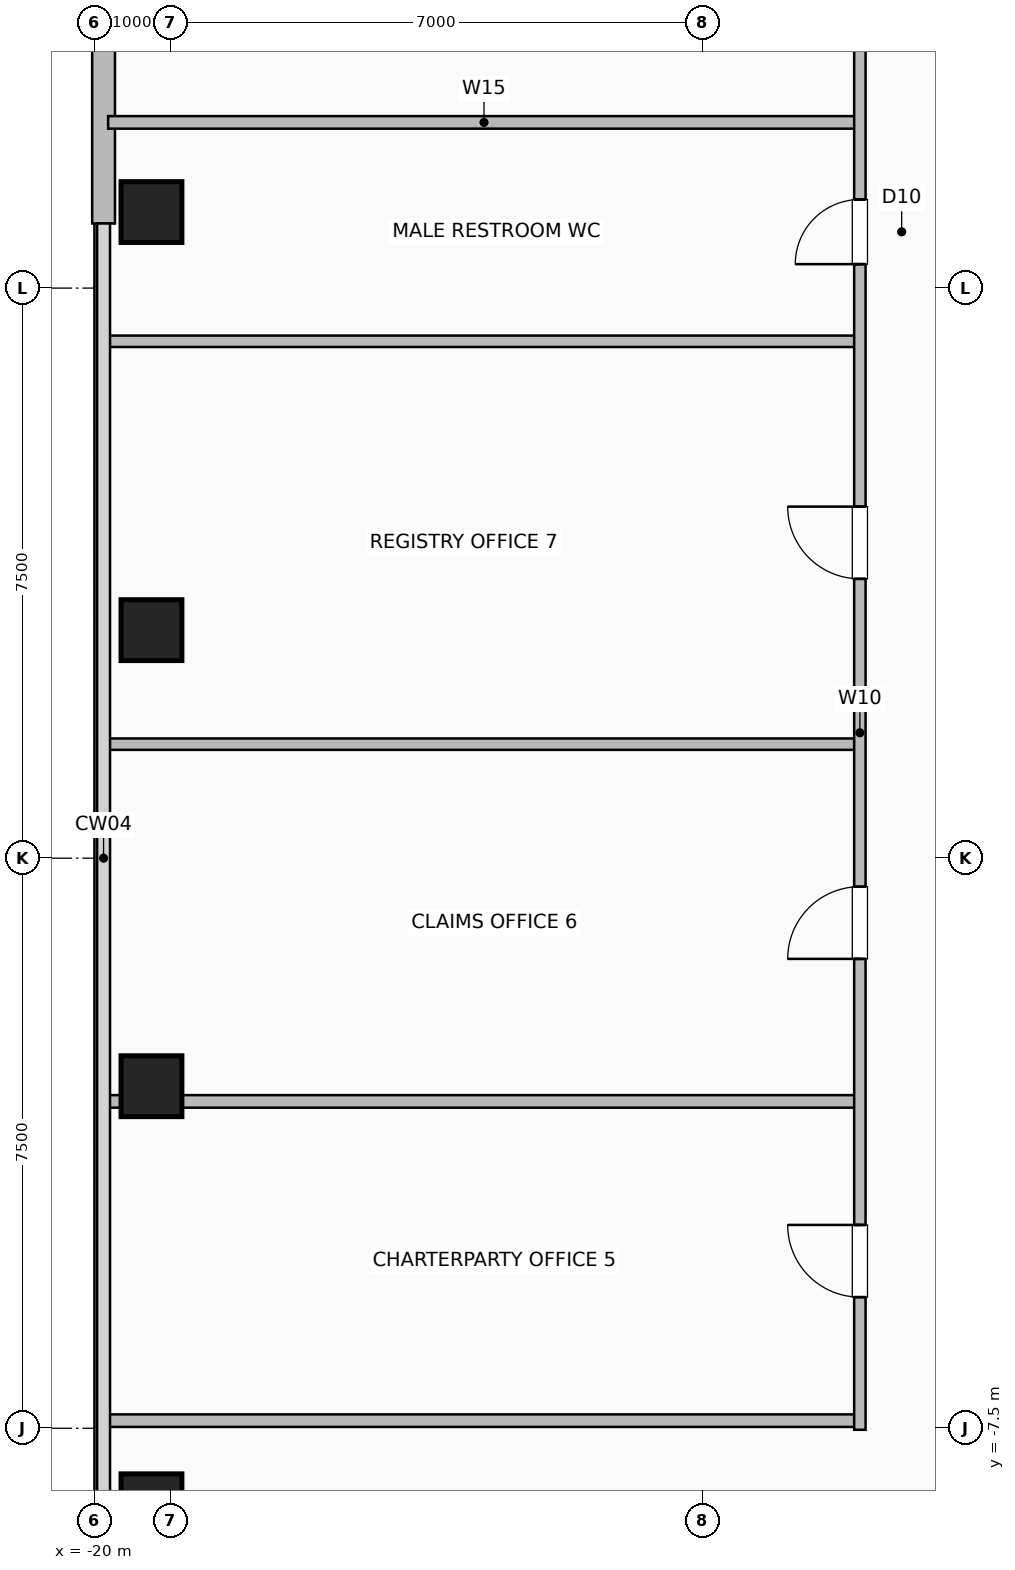
"""IFC4 building model, lengths in metres.
Left out: names, types, materials, properties, quantities, classifications, styles, units other than length and angle.
Written with IfcOpenShell. Run it as: python <this file> out.ifc"""

import sys

from ifc_helpers import new_model, si_unit, direction, frame, frame_2d, origin, origin_2d, place, context, subcontext, project, spatial, rectangle, hollow_rectangle, extrude, element, fill, save


model = new_model("IFC4")
c1 = context("Model", 3, precision=1e-05, world=origin(), true_north=direction((0.0, 1.0)))
c2 = subcontext(c1, "Body", "Model", "MODEL_VIEW")
j1 = project(units=[si_unit("LENGTHUNIT", "METRE"), si_unit("PLANEANGLEUNIT", "RADIAN")], contexts=[c1])
p1 = place(None, origin())
s1 = spatial("IfcSite", under=j1, at=p1, CompositionType="ELEMENT")
p2 = place(p1, origin())
s2 = spatial("IfcBuilding", under=s1, at=p2, CompositionType="ELEMENT")
p3 = place(p2, frame((0.0, 0.0, 169.8)))
s3 = spatial("IfcBuildingStorey", under=s2, at=p3, CompositionType="ELEMENT", Elevation=169.8)
for number, where, z_axis, x_axis in (
    (1, (-19.25, -8.5, 0.0), (0.0, 0.0, 1.0), (1.0, 0.0, 0.0)),
    (2, (-19.25, -3.0, 0.0), (0.0, 0.0, 1.0), (1.0, 0.0, 0.0)),
    (3, (-19.25, 3.0, 0.0), (0.0, 0.0, 1.0), (1.0, 0.0, 0.0)),
    (4, (-19.25, 8.5, 0.0), (0.0, 0.0, 1.0), (1.0, 0.0, 0.0)),
):
    element("IfcColumn", number, at=place(p3, frame(where, z_axis=z_axis, x_axis=x_axis)), inside=s3, PredefinedType="COLUMN", context=c2, shape_type="SweptSolid", body=[
        extrude(hollow_rectangle(XDim=0.8, YDim=0.8, WallThickness=0.04, at=origin_2d()), origin(), (0.0, 0.0, 1.0), 3.6),
    ])
p4 = place(p3, frame((-19.88, 8.35, 0.0), z_axis=(0.0, 0.0, 1.0), x_axis=(0.0, 1.0, 0.0)))
e5 = element("IfcWall", 5, at=p4, inside=s3, PredefinedType="SOLIDWALL", context=c2, shape_type="SweptSolid", body=[
    extrude(rectangle(XDim=4.8, YDim=0.3, at=frame_2d((2.4, 0.0))), origin(), (0.0, 0.0, 1.0), 3.36),
])
for number, where, z_axis, x_axis in (
    (6, (-19.82, 9.68, 0.0), (0.0, 0.0, 1.0), (1.0, 0.0, 0.0)),
    (7, (-19.82, -7.4, 0.0), (0.0, 0.0, 1.0), (1.0, 0.0, 0.0)),
    (8, (-19.82, -3.2, 0.0), (0.0, 0.0, 1.0), (1.0, 0.0, 0.0)),
):
    element("IfcWall", number, at=place(p3, frame(where, z_axis=z_axis, x_axis=x_axis)), inside=s3, PredefinedType="PLUMBINGWALL", context=c2, shape_type="SweptSolid", body=[
        extrude(rectangle(XDim=9.89, YDim=0.165, at=frame_2d((4.945, 0.0))), origin(), (0.0, 0.0, 1.0), 3.36),
    ])
for number, where, z_axis, x_axis in (
    (9, (-19.82, 1.5, 0.0), (0.0, 0.0, 1.0), (1.0, 0.0, 0.0)),
    (10, (-19.82, 6.8, 0.0), (0.0, 0.0, 1.0), (1.0, 0.0, 0.0)),
):
    element("IfcWall", number, at=place(p3, frame(where, z_axis=z_axis, x_axis=x_axis)), inside=s3, PredefinedType="PARTITIONING", context=c2, shape_type="SweptSolid", body=[
        extrude(rectangle(XDim=9.89, YDim=0.15, at=frame_2d((4.945, 0.0))), origin(), (0.0, 0.0, 1.0), 3.36),
    ])
p5 = place(p3, frame((-9.93, -7.52, 0.0), z_axis=(0.0, 0.0, 1.0), x_axis=(0.0, 1.0, 0.0)))
e11 = element("IfcWall", 11, at=p5, inside=s3, PredefinedType="PARTITIONING", context=c2, shape_type="SweptSolid", body=[
    extrude(rectangle(XDim=21.59, YDim=0.15, at=frame_2d((10.795, 0.0))), origin(), (0.0, 0.0, 1.0), 3.36),
])
p6 = place(p5, frame((1.745, 0.0, 0.0)))
e12 = element("IfcOpeningElement", 12, at=p6, cuts=e11, PredefinedType="OPENING", context=c2, shape_type="SweptSolid", body=[
    extrude(rectangle(XDim=0.95, YDim=2.06, at=frame_2d((0.475, 1.03))), frame((0.0, 0.085, 0.0), z_axis=(0.0, -1.0, 0.0), x_axis=(1.0, 0.0, 0.0)), (0.0, 0.0, 1.0), 0.17),
])
p7 = place(p5, frame((6.195, 0.0, 0.0)))
e13 = element("IfcOpeningElement", 13, at=p7, cuts=e11, PredefinedType="OPENING", context=c2, shape_type="SweptSolid", body=[
    extrude(rectangle(XDim=0.95, YDim=2.06, at=frame_2d((0.475, 1.03))), frame((0.0, 0.085, 0.0), z_axis=(0.0, -1.0, 0.0), x_axis=(1.0, 0.0, 0.0)), (0.0, 0.0, 1.0), 0.17),
])
p8 = place(p5, frame((11.195, 0.0, 0.0)))
e14 = element("IfcOpeningElement", 14, at=p8, cuts=e11, PredefinedType="OPENING", context=c2, shape_type="SweptSolid", body=[
    extrude(rectangle(XDim=0.95, YDim=2.06, at=frame_2d((0.475, 1.03))), frame((0.0, 0.085, 0.0), z_axis=(0.0, -1.0, 0.0), x_axis=(1.0, 0.0, 0.0)), (0.0, 0.0, 1.0), 0.17),
])
p9 = place(p5, frame((15.335, 0.0, 0.0)))
e15 = element("IfcOpeningElement", 15, at=p9, cuts=e11, PredefinedType="OPENING", context=c2, shape_type="SweptSolid", body=[
    extrude(rectangle(XDim=0.85, YDim=2.05, at=frame_2d((0.425, 1.025))), frame((0.0, 0.085, 0.0), z_axis=(0.0, -1.0, 0.0), x_axis=(1.0, 0.0, 0.0)), (0.0, 0.0, 1.0), 0.17),
])
p10 = place(p5, frame((18.86, 0.0, 0.0)))
e16 = element("IfcOpeningElement", 16, at=p10, cuts=e11, PredefinedType="OPENING", context=c2, shape_type="SweptSolid", body=[
    extrude(rectangle(XDim=0.95, YDim=2.06, at=frame_2d((0.475, 1.03))), frame((0.0, 0.085, 0.0), z_axis=(0.0, -1.0, 0.0), x_axis=(1.0, 0.0, 0.0)), (0.0, 0.0, 1.0), 0.17),
])
p11 = place(p6, origin())
e17 = element("IfcDoor", 17, at=p11, inside=s3, OperationType="SINGLE_SWING_RIGHT", PredefinedType="DOOR", context=c2, shape_type="SweptSolid", body=[
    extrude(rectangle(XDim=0.95, YDim=2.06, at=frame_2d((0.475, 1.03))), frame((0.0, 0.025, 0.0), z_axis=(0.0, -1.0, 0.0), x_axis=(1.0, 0.0, 0.0)), (0.0, 0.0, 1.0), 0.05),
])
fill(e12, e17)
p12 = place(p7, origin())
e18 = element("IfcDoor", 18, at=p12, inside=s3, OperationType="SINGLE_SWING_LEFT", PredefinedType="DOOR", context=c2, shape_type="SweptSolid", body=[
    extrude(rectangle(XDim=0.95, YDim=2.06, at=frame_2d((0.475, 1.03))), frame((0.0, 0.025, 0.0), z_axis=(0.0, -1.0, 0.0), x_axis=(1.0, 0.0, 0.0)), (0.0, 0.0, 1.0), 0.05),
])
fill(e13, e18)
p13 = place(p8, origin())
e19 = element("IfcDoor", 19, at=p13, inside=s3, OperationType="SINGLE_SWING_RIGHT", PredefinedType="DOOR", context=c2, shape_type="SweptSolid", body=[
    extrude(rectangle(XDim=0.95, YDim=2.06, at=frame_2d((0.475, 1.03))), frame((0.0, 0.025, 0.0), z_axis=(0.0, -1.0, 0.0), x_axis=(1.0, 0.0, 0.0)), (0.0, 0.0, 1.0), 0.05),
])
fill(e14, e19)
p14 = place(p9, origin())
e20 = element("IfcDoor", 20, at=p14, inside=s3, OperationType="SINGLE_SWING_LEFT", PredefinedType="DOOR", context=c2, shape_type="SweptSolid", body=[
    extrude(rectangle(XDim=0.85, YDim=2.05, at=frame_2d((0.425, 1.025))), frame((0.0, 0.025, 0.0), z_axis=(0.0, -1.0, 0.0), x_axis=(1.0, 0.0, 0.0)), (0.0, 0.0, 1.0), 0.05),
])
fill(e15, e20)
save(model, sys.argv[1])
